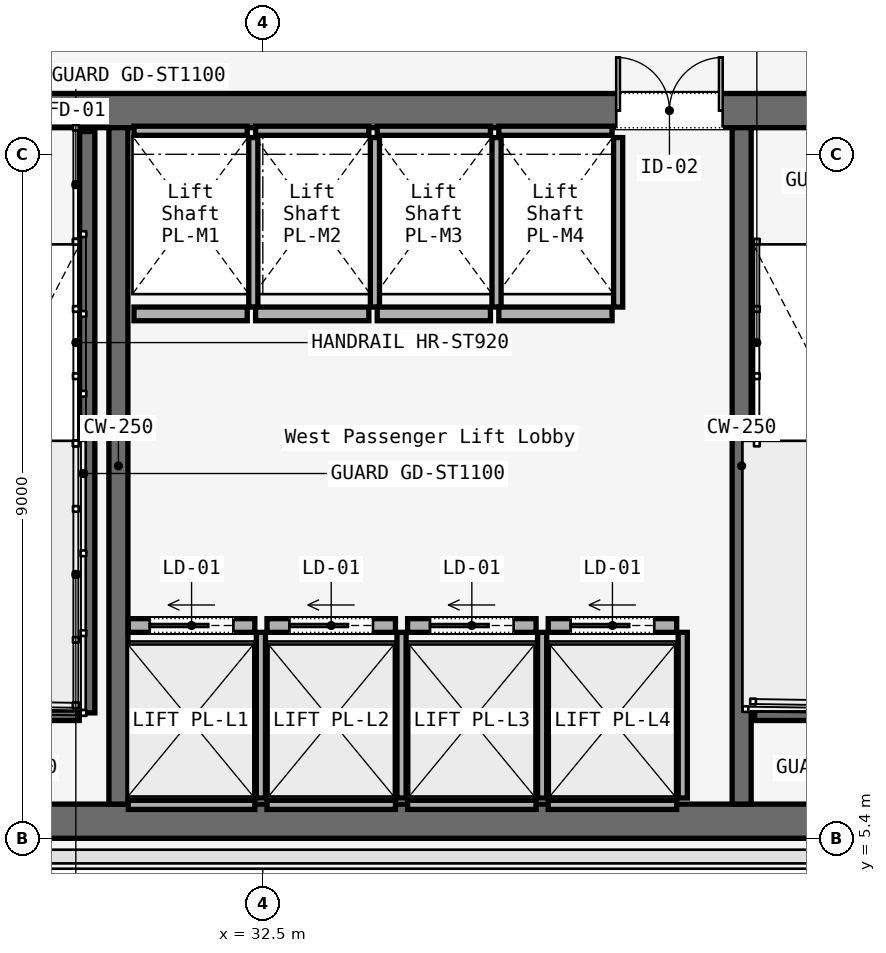
"""IFC4 building model, lengths in metres.
Left out: names, types, materials, properties, quantities, classifications, styles, units other than length and angle.
Written with IfcOpenShell. Run it as: python <this file> out.ifc"""

import sys

from ifc_helpers import new_model, si_unit, direction, frame, frame_2d, origin, place, context, subcontext, project, spatial, rectangle, extrude, element, fill, save


model = new_model("IFC4")
c1 = context("Model", 3, precision=1e-05, world=origin(), true_north=direction((0.0, 1.0)))
c2 = subcontext(c1, "Body", "Model", "MODEL_VIEW")
j1 = project(units=[si_unit("LENGTHUNIT", "METRE"), si_unit("PLANEANGLEUNIT", "RADIAN")], contexts=[c1])
p1 = place(None, origin())
s1 = spatial("IfcSite", under=j1, at=p1, CompositionType="ELEMENT")
p2 = place(p1, origin())
s2 = spatial("IfcBuilding", under=s1, at=p2, CompositionType="ELEMENT")
p3 = place(p2, frame((0.0, 0.0, 66.4)))
s3 = spatial("IfcBuildingStorey", under=s2, at=p3, CompositionType="ELEMENT", Elevation=66.4)
p4 = place(p3, frame((26.45, 14.975, 0.0), z_axis=(0.0, 0.0, 1.0), x_axis=(1.0, 0.0, 0.0)))
e1 = element("IfcWall", 1, at=p4, inside=s3, PredefinedType="SOLIDWALL", context=c2, shape_type="SweptSolid", body=[
    extrude(rectangle(XDim=31.1, YDim=0.45, at=frame_2d((15.55, 0.0))), origin(), (0.0, 0.0, 1.0), 3.58),
])
p5 = place(p4, frame((1.65, 0.0, 0.0)))
e2 = element("IfcOpeningElement", 2, at=p5, cuts=e1, PredefinedType="OPENING", context=c2, shape_type="SweptSolid", body=[
    extrude(rectangle(XDim=1.1, YDim=2.2, at=frame_2d((0.55, 1.1))), frame((0.0, 0.225, 0.0), z_axis=(0.0, -1.0, 0.0), x_axis=(1.0, 0.0, 0.0)), (0.0, 0.0, 1.0), 0.45),
])
p6 = place(p4, frame((13.65, 0.0, 0.0)))
e3 = element("IfcOpeningElement", 3, at=p6, cuts=e1, PredefinedType="OPENING", context=c2, shape_type="SweptSolid", body=[
    extrude(rectangle(XDim=1.1, YDim=2.2, at=frame_2d((0.55, 1.1))), frame((0.0, 0.225, 0.0), z_axis=(0.0, -1.0, 0.0), x_axis=(1.0, 0.0, 0.0)), (0.0, 0.0, 1.0), 0.45),
])
p7 = place(p4, frame((25.55, 0.0, 0.0)))
e4 = element("IfcOpeningElement", 4, at=p7, cuts=e1, PredefinedType="OPENING", context=c2, shape_type="SweptSolid", body=[
    extrude(rectangle(XDim=1.1, YDim=2.2, at=frame_2d((0.55, 1.1))), frame((0.0, 0.225, 0.0), z_axis=(0.0, -1.0, 0.0), x_axis=(1.0, 0.0, 0.0)), (0.0, 0.0, 1.0), 0.45),
])
p8 = place(p4, frame((10.7, 0.0, 0.0)))
e5 = element("IfcOpeningElement", 5, at=p8, cuts=e1, PredefinedType="OPENING", context=c2, shape_type="SweptSolid", body=[
    extrude(rectangle(XDim=1.4, YDim=2.2, at=frame_2d((0.7, 1.1))), frame((0.0, 0.225, 0.0), z_axis=(0.0, -1.0, 0.0), x_axis=(1.0, 0.0, 0.0)), (0.0, 0.0, 1.0), 0.45),
])
p9 = place(p4, frame((19.35, 0.0, 0.0)))
e6 = element("IfcOpeningElement", 6, at=p9, cuts=e1, PredefinedType="OPENING", context=c2, shape_type="SweptSolid", body=[
    extrude(rectangle(XDim=1.1, YDim=2.2, at=frame_2d((0.55, 1.1))), frame((0.0, 0.225, 0.0), z_axis=(0.0, -1.0, 0.0), x_axis=(1.0, 0.0, 0.0)), (0.0, 0.0, 1.0), 0.45),
])
p10 = place(p4, frame((21.4, 0.0, 0.0)))
e7 = element("IfcOpeningElement", 7, at=p10, cuts=e1, PredefinedType="OPENING", context=c2, shape_type="SweptSolid", body=[
    extrude(rectangle(XDim=0.9, YDim=2.1, at=frame_2d((0.45, 1.05))), frame((0.0, 0.225, 0.0), z_axis=(0.0, -1.0, 0.0), x_axis=(1.0, 0.0, 0.0)), (0.0, 0.0, 1.0), 0.45),
])
p11 = place(p4, frame((23.35, 0.0, 0.0)))
e8 = element("IfcOpeningElement", 8, at=p11, cuts=e1, PredefinedType="OPENING", context=c2, shape_type="SweptSolid", body=[
    extrude(rectangle(XDim=1.3, YDim=2.3, at=frame_2d((0.65, 1.15))), frame((0.0, 0.225, 0.0), z_axis=(0.0, -1.0, 0.0), x_axis=(1.0, 0.0, 0.0)), (0.0, 0.0, 1.0), 0.45),
])
p12 = place(p3, frame((26.45, 5.625, 0.0), z_axis=(0.0, 0.0, 1.0), x_axis=(1.0, 0.0, 0.0)))
e9 = element("IfcWall", 9, at=p12, inside=s3, PredefinedType="SOLIDWALL", context=c2, shape_type="SweptSolid", body=[
    extrude(rectangle(XDim=31.1, YDim=0.45, at=frame_2d((15.55, 0.0))), origin(), (0.0, 0.0, 1.0), 3.58),
])
for number, where, z_axis, x_axis in (
    (10, (30.6, 5.85, 0.0), (0.0, 0.0, 1.0), (0.0, 1.0, 0.0)),
    (11, (38.8, 5.85, 0.0), (0.0, 0.0, 1.0), (0.0, 1.0, 0.0)),
):
    element("IfcWall", number, at=place(p3, frame(where, z_axis=z_axis, x_axis=x_axis)), inside=s3, PredefinedType="SOLIDWALL", context=c2, shape_type="SweptSolid", body=[
        extrude(rectangle(XDim=8.9, YDim=0.25, at=frame_2d((4.45, 0.0))), origin(), (0.0, 0.0, 1.0), 3.58),
    ])
p13 = place(p3, frame((30.19, 14.7, 0.0), z_axis=(0.0, 0.0, 1.0), x_axis=(0.0, -1.0, 0.0)))
e12 = element("IfcWall", 12, at=p13, inside=s3, PredefinedType="SOLIDWALL", context=c2, shape_type="SweptSolid", body=[
    extrude(rectangle(XDim=7.65, YDim=0.2, at=frame_2d((3.825, 0.0))), origin(), (0.0, 0.0, 1.0), 3.8),
])
for number, where, z_axis, x_axis in (
    (13, (26.97, 7.05, 0.0), (0.0, 0.0, 1.0), (1.0, 0.0, 0.0)),
    (14, (38.97, 7.05, 0.0), (0.0, 0.0, 1.0), (1.0, 0.0, 0.0)),
):
    element("IfcWall", number, at=place(p3, frame(where, z_axis=z_axis, x_axis=x_axis)), inside=s3, PredefinedType="SOLIDWALL", context=c2, shape_type="SweptSolid", body=[
        extrude(rectangle(XDim=3.115, YDim=0.2, at=frame_2d((1.558, 0.0))), origin(), (0.0, 0.0, 1.0), 3.8),
    ])
p14 = place(p3, frame((30.73, 8.2, 0.0), z_axis=(0.0, 0.0, 1.0), x_axis=(1.0, 0.0, 0.0)))
e15 = element("IfcWall", 15, at=p14, inside=s3, PredefinedType="SOLIDWALL", context=c2, shape_type="SweptSolid", body=[
    extrude(rectangle(XDim=1.665, YDim=0.18, at=frame_2d((0.833, 0.0))), origin(), (0.0, 0.0, 1.0), 2.95),
])
p15 = place(p14, frame((0.282, 0.0, 0.0)))
e16 = element("IfcOpeningElement", 16, at=p15, cuts=e15, PredefinedType="OPENING", context=c2, shape_type="SweptSolid", body=[
    extrude(rectangle(XDim=1.1, YDim=2.2, at=frame_2d((0.55, 1.1))), frame((0.0, 0.09, 0.0), z_axis=(0.0, -1.0, 0.0), x_axis=(1.0, 0.0, 0.0)), (0.0, 0.0, 1.0), 0.18),
])
p16 = place(p3, frame((30.73, 5.84, 0.0), z_axis=(0.0, 0.0, 1.0), x_axis=(1.0, 0.0, 0.0)))
e17 = element("IfcWall", 17, at=p16, inside=s3, PredefinedType="SOLIDWALL", context=c2, shape_type="SweptSolid", body=[
    extrude(rectangle(XDim=1.665, YDim=0.12, at=frame_2d((0.833, 0.0))), origin(), (0.0, 0.0, 1.0), 2.95),
])
p17 = place(p3, frame((32.475, 5.93, 0.0), z_axis=(0.0, 0.0, 1.0), x_axis=(0.0, 1.0, 0.0)))
e18 = element("IfcWall", 18, at=p17, inside=s3, PredefinedType="SOLIDWALL", context=c2, shape_type="SweptSolid", body=[
    extrude(rectangle(XDim=2.18, YDim=0.12, at=frame_2d((1.09, 0.0))), origin(), (0.0, 0.0, 1.0), 2.95),
])
p18 = place(p3, frame((32.555, 8.2, 0.0), z_axis=(0.0, 0.0, 1.0), x_axis=(1.0, 0.0, 0.0)))
e19 = element("IfcWall", 19, at=p18, inside=s3, PredefinedType="SOLIDWALL", context=c2, shape_type="SweptSolid", body=[
    extrude(rectangle(XDim=1.69, YDim=0.18, at=frame_2d((0.845, 0.0))), origin(), (0.0, 0.0, 1.0), 2.95),
])
p19 = place(p18, frame((0.295, 0.0, 0.0)))
e20 = element("IfcOpeningElement", 20, at=p19, cuts=e19, PredefinedType="OPENING", context=c2, shape_type="SweptSolid", body=[
    extrude(rectangle(XDim=1.1, YDim=2.2, at=frame_2d((0.55, 1.1))), frame((0.0, 0.09, 0.0), z_axis=(0.0, -1.0, 0.0), x_axis=(1.0, 0.0, 0.0)), (0.0, 0.0, 1.0), 0.18),
])
p20 = place(p3, frame((32.555, 5.84, 0.0), z_axis=(0.0, 0.0, 1.0), x_axis=(1.0, 0.0, 0.0)))
e21 = element("IfcWall", 21, at=p20, inside=s3, PredefinedType="SOLIDWALL", context=c2, shape_type="SweptSolid", body=[
    extrude(rectangle(XDim=1.69, YDim=0.12, at=frame_2d((0.845, 0.0))), origin(), (0.0, 0.0, 1.0), 2.95),
])
p21 = place(p3, frame((34.325, 5.93, 0.0), z_axis=(0.0, 0.0, 1.0), x_axis=(0.0, 1.0, 0.0)))
e22 = element("IfcWall", 22, at=p21, inside=s3, PredefinedType="SOLIDWALL", context=c2, shape_type="SweptSolid", body=[
    extrude(rectangle(XDim=2.18, YDim=0.12, at=frame_2d((1.09, 0.0))), origin(), (0.0, 0.0, 1.0), 2.95),
])
p22 = place(p3, frame((34.405, 8.2, 0.0), z_axis=(0.0, 0.0, 1.0), x_axis=(1.0, 0.0, 0.0)))
e23 = element("IfcWall", 23, at=p22, inside=s3, PredefinedType="SOLIDWALL", context=c2, shape_type="SweptSolid", body=[
    extrude(rectangle(XDim=1.69, YDim=0.18, at=frame_2d((0.845, 0.0))), origin(), (0.0, 0.0, 1.0), 2.95),
])
p23 = place(p22, frame((0.295, 0.0, 0.0)))
e24 = element("IfcOpeningElement", 24, at=p23, cuts=e23, PredefinedType="OPENING", context=c2, shape_type="SweptSolid", body=[
    extrude(rectangle(XDim=1.1, YDim=2.2, at=frame_2d((0.55, 1.1))), frame((0.0, 0.09, 0.0), z_axis=(0.0, -1.0, 0.0), x_axis=(1.0, 0.0, 0.0)), (0.0, 0.0, 1.0), 0.18),
])
p24 = place(p3, frame((34.405, 5.84, 0.0), z_axis=(0.0, 0.0, 1.0), x_axis=(1.0, 0.0, 0.0)))
e25 = element("IfcWall", 25, at=p24, inside=s3, PredefinedType="SOLIDWALL", context=c2, shape_type="SweptSolid", body=[
    extrude(rectangle(XDim=1.69, YDim=0.12, at=frame_2d((0.845, 0.0))), origin(), (0.0, 0.0, 1.0), 2.95),
])
p25 = place(p3, frame((36.175, 5.93, 0.0), z_axis=(0.0, 0.0, 1.0), x_axis=(0.0, 1.0, 0.0)))
e26 = element("IfcWall", 26, at=p25, inside=s3, PredefinedType="SOLIDWALL", context=c2, shape_type="SweptSolid", body=[
    extrude(rectangle(XDim=2.18, YDim=0.12, at=frame_2d((1.09, 0.0))), origin(), (0.0, 0.0, 1.0), 2.95),
])
p26 = place(p3, frame((36.255, 8.2, 0.0), z_axis=(0.0, 0.0, 1.0), x_axis=(1.0, 0.0, 0.0)))
e27 = element("IfcWall", 27, at=p26, inside=s3, PredefinedType="SOLIDWALL", context=c2, shape_type="SweptSolid", body=[
    extrude(rectangle(XDim=1.69, YDim=0.18, at=frame_2d((0.845, 0.0))), origin(), (0.0, 0.0, 1.0), 2.95),
])
p27 = place(p26, frame((0.295, 0.0, 0.0)))
e28 = element("IfcOpeningElement", 28, at=p27, cuts=e27, PredefinedType="OPENING", context=c2, shape_type="SweptSolid", body=[
    extrude(rectangle(XDim=1.1, YDim=2.2, at=frame_2d((0.55, 1.1))), frame((0.0, 0.09, 0.0), z_axis=(0.0, -1.0, 0.0), x_axis=(1.0, 0.0, 0.0)), (0.0, 0.0, 1.0), 0.18),
])
p28 = place(p3, frame((36.255, 5.84, 0.0), z_axis=(0.0, 0.0, 1.0), x_axis=(1.0, 0.0, 0.0)))
e29 = element("IfcWall", 29, at=p28, inside=s3, PredefinedType="SOLIDWALL", context=c2, shape_type="SweptSolid", body=[
    extrude(rectangle(XDim=1.69, YDim=0.12, at=frame_2d((0.845, 0.0))), origin(), (0.0, 0.0, 1.0), 2.95),
])
p29 = place(p3, frame((38.025, 5.93, 0.0), z_axis=(0.0, 0.0, 1.0), x_axis=(0.0, 1.0, 0.0)))
e30 = element("IfcWall", 30, at=p29, inside=s3, PredefinedType="SOLIDWALL", context=c2, shape_type="SweptSolid", body=[
    extrude(rectangle(XDim=2.18, YDim=0.12, at=frame_2d((1.09, 0.0))), origin(), (0.0, 0.0, 1.0), 2.95),
])
p30 = place(p3, frame((30.805, 12.3, 0.0), z_axis=(0.0, 0.0, 1.0), x_axis=(1.0, 0.0, 0.0)))
e31 = element("IfcWall", 31, at=p30, inside=s3, PredefinedType="SOLIDWALL", context=c2, shape_type="SweptSolid", body=[
    extrude(rectangle(XDim=1.49, YDim=0.18, at=frame_2d((0.745, 0.0))), origin(), (0.0, 0.0, 1.0), 2.95),
])
p31 = place(p3, frame((30.805, 14.71, 0.0), z_axis=(0.0, 0.0, 1.0), x_axis=(1.0, 0.0, 0.0)))
e32 = element("IfcWall", 32, at=p31, inside=s3, PredefinedType="SOLIDWALL", context=c2, shape_type="SweptSolid", body=[
    extrude(rectangle(XDim=1.49, YDim=0.12, at=frame_2d((0.745, 0.0))), origin(), (0.0, 0.0, 1.0), 2.95),
])
p32 = place(p3, frame((32.375, 12.39, 0.0), z_axis=(0.0, 0.0, 1.0), x_axis=(0.0, 1.0, 0.0)))
e33 = element("IfcWall", 33, at=p32, inside=s3, PredefinedType="SOLIDWALL", context=c2, shape_type="SweptSolid", body=[
    extrude(rectangle(XDim=2.23, YDim=0.12, at=frame_2d((1.115, 0.0))), origin(), (0.0, 0.0, 1.0), 2.95),
])
p33 = place(p3, frame((32.405, 12.3, 0.0), z_axis=(0.0, 0.0, 1.0), x_axis=(1.0, 0.0, 0.0)))
e34 = element("IfcWall", 34, at=p33, inside=s3, PredefinedType="SOLIDWALL", context=c2, shape_type="SweptSolid", body=[
    extrude(rectangle(XDim=1.49, YDim=0.18, at=frame_2d((0.745, 0.0))), origin(), (0.0, 0.0, 1.0), 2.95),
])
p34 = place(p3, frame((32.405, 14.71, 0.0), z_axis=(0.0, 0.0, 1.0), x_axis=(1.0, 0.0, 0.0)))
e35 = element("IfcWall", 35, at=p34, inside=s3, PredefinedType="SOLIDWALL", context=c2, shape_type="SweptSolid", body=[
    extrude(rectangle(XDim=1.49, YDim=0.12, at=frame_2d((0.745, 0.0))), origin(), (0.0, 0.0, 1.0), 2.95),
])
p35 = place(p3, frame((33.975, 12.39, 0.0), z_axis=(0.0, 0.0, 1.0), x_axis=(0.0, 1.0, 0.0)))
e36 = element("IfcWall", 36, at=p35, inside=s3, PredefinedType="SOLIDWALL", context=c2, shape_type="SweptSolid", body=[
    extrude(rectangle(XDim=2.23, YDim=0.12, at=frame_2d((1.115, 0.0))), origin(), (0.0, 0.0, 1.0), 2.95),
])
p36 = place(p3, frame((34.005, 12.3, 0.0), z_axis=(0.0, 0.0, 1.0), x_axis=(1.0, 0.0, 0.0)))
e37 = element("IfcWall", 37, at=p36, inside=s3, PredefinedType="SOLIDWALL", context=c2, shape_type="SweptSolid", body=[
    extrude(rectangle(XDim=1.49, YDim=0.18, at=frame_2d((0.745, 0.0))), origin(), (0.0, 0.0, 1.0), 2.95),
])
p37 = place(p3, frame((34.005, 14.71, 0.0), z_axis=(0.0, 0.0, 1.0), x_axis=(1.0, 0.0, 0.0)))
e38 = element("IfcWall", 38, at=p37, inside=s3, PredefinedType="SOLIDWALL", context=c2, shape_type="SweptSolid", body=[
    extrude(rectangle(XDim=1.49, YDim=0.12, at=frame_2d((0.745, 0.0))), origin(), (0.0, 0.0, 1.0), 2.95),
])
p38 = place(p3, frame((35.575, 12.39, 0.0), z_axis=(0.0, 0.0, 1.0), x_axis=(0.0, 1.0, 0.0)))
e39 = element("IfcWall", 39, at=p38, inside=s3, PredefinedType="SOLIDWALL", context=c2, shape_type="SweptSolid", body=[
    extrude(rectangle(XDim=2.23, YDim=0.12, at=frame_2d((1.115, 0.0))), origin(), (0.0, 0.0, 1.0), 2.95),
])
p39 = place(p3, frame((35.605, 12.3, 0.0), z_axis=(0.0, 0.0, 1.0), x_axis=(1.0, 0.0, 0.0)))
e40 = element("IfcWall", 40, at=p39, inside=s3, PredefinedType="SOLIDWALL", context=c2, shape_type="SweptSolid", body=[
    extrude(rectangle(XDim=1.49, YDim=0.18, at=frame_2d((0.745, 0.0))), origin(), (0.0, 0.0, 1.0), 2.95),
])
p40 = place(p3, frame((35.605, 14.71, 0.0), z_axis=(0.0, 0.0, 1.0), x_axis=(1.0, 0.0, 0.0)))
e41 = element("IfcWall", 41, at=p40, inside=s3, PredefinedType="SOLIDWALL", context=c2, shape_type="SweptSolid", body=[
    extrude(rectangle(XDim=1.49, YDim=0.12, at=frame_2d((0.745, 0.0))), origin(), (0.0, 0.0, 1.0), 2.95),
])
p41 = place(p3, frame((37.175, 12.39, 0.0), z_axis=(0.0, 0.0, 1.0), x_axis=(0.0, 1.0, 0.0)))
e42 = element("IfcWall", 42, at=p41, inside=s3, PredefinedType="SOLIDWALL", context=c2, shape_type="SweptSolid", body=[
    extrude(rectangle(XDim=2.23, YDim=0.12, at=frame_2d((1.115, 0.0))), origin(), (0.0, 0.0, 1.0), 2.95),
])
p42 = place(p8, origin())
e43 = element("IfcDoor", 43, at=p42, inside=s3, OperationType="DOUBLE_DOOR_SINGLE_SWING", PredefinedType="DOOR", context=c2, shape_type="SweptSolid", body=[
    extrude(rectangle(XDim=1.4, YDim=2.2, at=frame_2d((0.7, 1.1))), frame((0.0, 0.025, 0.0), z_axis=(0.0, -1.0, 0.0), x_axis=(1.0, 0.0, 0.0)), (0.0, 0.0, 1.0), 0.05),
])
fill(e5, e43)
p43 = place(p15, origin())
e44 = element("IfcDoor", 44, at=p43, inside=s3, OperationType="SLIDING_TO_LEFT", PredefinedType="DOOR", context=c2, shape_type="SweptSolid", body=[
    extrude(rectangle(XDim=1.1, YDim=2.2, at=frame_2d((0.55, 1.1))), frame((0.0, 0.025, 0.0), z_axis=(0.0, -1.0, 0.0), x_axis=(1.0, 0.0, 0.0)), (0.0, 0.0, 1.0), 0.05),
])
fill(e16, e44)
p44 = place(p19, origin())
e45 = element("IfcDoor", 45, at=p44, inside=s3, OperationType="SLIDING_TO_LEFT", PredefinedType="DOOR", context=c2, shape_type="SweptSolid", body=[
    extrude(rectangle(XDim=1.1, YDim=2.2, at=frame_2d((0.55, 1.1))), frame((0.0, 0.025, 0.0), z_axis=(0.0, -1.0, 0.0), x_axis=(1.0, 0.0, 0.0)), (0.0, 0.0, 1.0), 0.05),
])
fill(e20, e45)
p45 = place(p23, origin())
e46 = element("IfcDoor", 46, at=p45, inside=s3, OperationType="SLIDING_TO_LEFT", PredefinedType="DOOR", context=c2, shape_type="SweptSolid", body=[
    extrude(rectangle(XDim=1.1, YDim=2.2, at=frame_2d((0.55, 1.1))), frame((0.0, 0.025, 0.0), z_axis=(0.0, -1.0, 0.0), x_axis=(1.0, 0.0, 0.0)), (0.0, 0.0, 1.0), 0.05),
])
fill(e24, e46)
p46 = place(p27, origin())
e47 = element("IfcDoor", 47, at=p46, inside=s3, OperationType="SLIDING_TO_LEFT", PredefinedType="DOOR", context=c2, shape_type="SweptSolid", body=[
    extrude(rectangle(XDim=1.1, YDim=2.2, at=frame_2d((0.55, 1.1))), frame((0.0, 0.025, 0.0), z_axis=(0.0, -1.0, 0.0), x_axis=(1.0, 0.0, 0.0)), (0.0, 0.0, 1.0), 0.05),
])
fill(e28, e47)
save(model, sys.argv[1])
